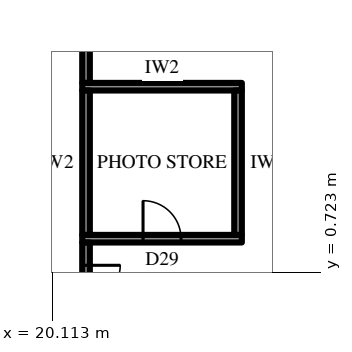
"""IFC4 building model, lengths in metres.
Left out: names, types, materials, properties, quantities, classifications, styles, units other than length and angle.
Written with IfcOpenShell. Run it as: python <this file> out.ifc"""

import sys

from ifc_helpers import new_model, si_unit, direction, frame, frame_2d, origin, place, context, subcontext, project, spatial, rectangle, extrude, element, fill, save


model = new_model("IFC4")
c1 = context("Model", 3, precision=1e-05, world=origin(), true_north=direction((0.0, 1.0)))
c2 = subcontext(c1, "Body", "Model", "MODEL_VIEW")
j1 = project(units=[si_unit("LENGTHUNIT", "METRE"), si_unit("PLANEANGLEUNIT", "RADIAN")], contexts=[c1])
p1 = place(None, origin())
s1 = spatial("IfcSite", under=j1, at=p1, CompositionType="ELEMENT")
p2 = place(p1, origin())
s2 = spatial("IfcBuilding", under=s1, at=p2, CompositionType="ELEMENT")
p3 = place(p2, frame((0.0, 0.0, 103.3)))
s3 = spatial("IfcBuildingStorey", under=s2, at=p3, CompositionType="ELEMENT", Elevation=103.3)
p4 = place(p3, frame((20.9, 1.6, 0.0), z_axis=(0.0, 0.0, 1.0), x_axis=(1.0, 0.0, 0.0)))
e1 = element("IfcWall", 1, at=p4, inside=s3, PredefinedType="PARTITIONING", context=c2, shape_type="SweptSolid", body=[
    extrude(rectangle(XDim=4.2, YDim=0.2, at=frame_2d((2.1, 0.0))), origin(), (0.0, 0.0, 1.0), 3.9),
])
p5 = place(p4, frame((1.6, 0.0, 0.0)))
e2 = element("IfcOpeningElement", 2, at=p5, cuts=e1, PredefinedType="OPENING", context=c2, shape_type="SweptSolid", body=[
    extrude(rectangle(XDim=1.0, YDim=2.2, at=frame_2d((0.5, 1.1))), frame((0.0, 0.11, 0.0), z_axis=(0.0, -1.0, 0.0), x_axis=(1.0, 0.0, 0.0)), (0.0, 0.0, 1.0), 0.22),
])
p6 = place(p3, frame((20.9, 5.6, 0.0), z_axis=(0.0, 0.0, 1.0), x_axis=(1.0, 0.0, 0.0)))
e3 = element("IfcWall", 3, at=p6, inside=s3, PredefinedType="PARTITIONING", context=c2, shape_type="SweptSolid", body=[
    extrude(rectangle(XDim=4.2, YDim=0.2, at=frame_2d((2.1, 0.0))), origin(), (0.0, 0.0, 1.0), 3.9),
])
for number, where, z_axis, x_axis in (
    (4, (21.0, 1.7, 0.0), (0.0, 0.0, 1.0), (0.0, 1.0, 0.0)),
    (5, (25.0, 1.7, 0.0), (0.0, 0.0, 1.0), (0.0, 1.0, 0.0)),
):
    element("IfcWall", number, at=place(p3, frame(where, z_axis=z_axis, x_axis=x_axis)), inside=s3, PredefinedType="PARTITIONING", context=c2, shape_type="SweptSolid", body=[
        extrude(rectangle(XDim=3.8, YDim=0.2, at=frame_2d((1.9, 0.0))), origin(), (0.0, 0.0, 1.0), 3.9),
    ])
p7 = place(p3, frame((21.0, 1.499, 0.0), z_axis=(0.0, 0.0, 1.0), x_axis=(0.0, -1.0, 0.0)))
e6 = element("IfcWall", 6, at=p7, inside=s3, PredefinedType="PARTITIONING", context=c2, shape_type="SweptSolid", body=[
    extrude(rectangle(XDim=14.199, YDim=0.2, at=frame_2d((7.1, 0.0))), origin(), (0.0, 0.0, 1.0), 3.9),
])
p8 = place(p7, frame((0.599, 0.0, 0.0)))
e7 = element("IfcOpeningElement", 7, at=p8, cuts=e6, PredefinedType="OPENING", context=c2, shape_type="SweptSolid", body=[
    extrude(rectangle(XDim=1.8, YDim=2.4, at=frame_2d((0.9, 1.2))), frame((0.0, 0.11, 0.0), z_axis=(0.0, -1.0, 0.0), x_axis=(1.0, 0.0, 0.0)), (0.0, 0.0, 1.0), 0.22),
])
p9 = place(p3, frame((21.0, 12.7, 0.0), z_axis=(0.0, 0.0, 1.0), x_axis=(0.0, -1.0, 0.0)))
e8 = element("IfcWall", 8, at=p9, inside=s3, PredefinedType="PARTITIONING", context=c2, shape_type="SweptSolid", body=[
    extrude(rectangle(XDim=6.999, YDim=0.2, at=frame_2d((3.5, 0.0))), origin(), (0.0, 0.0, 1.0), 3.9),
])
p10 = place(p5, origin())
e9 = element("IfcDoor", 9, at=p10, inside=s3, OperationType="SINGLE_SWING_RIGHT", PredefinedType="DOOR", context=c2, shape_type="SweptSolid", body=[
    extrude(rectangle(XDim=1.0, YDim=2.2, at=frame_2d((0.5, 1.1))), frame((0.0, 0.025, 0.0), z_axis=(0.0, -1.0, 0.0), x_axis=(1.0, 0.0, 0.0)), (0.0, 0.0, 1.0), 0.05),
])
fill(e2, e9)
p11 = place(p8, origin())
e10 = element("IfcDoor", 10, at=p11, inside=s3, OperationType="DOUBLE_DOOR_SINGLE_SWING", PredefinedType="DOOR", context=c2, shape_type="SweptSolid", body=[
    extrude(rectangle(XDim=1.8, YDim=2.4, at=frame_2d((0.9, 1.2))), frame((0.0, 0.025, 0.0), z_axis=(0.0, -1.0, 0.0), x_axis=(1.0, 0.0, 0.0)), (0.0, 0.0, 1.0), 0.05),
])
fill(e7, e10)
save(model, sys.argv[1])
